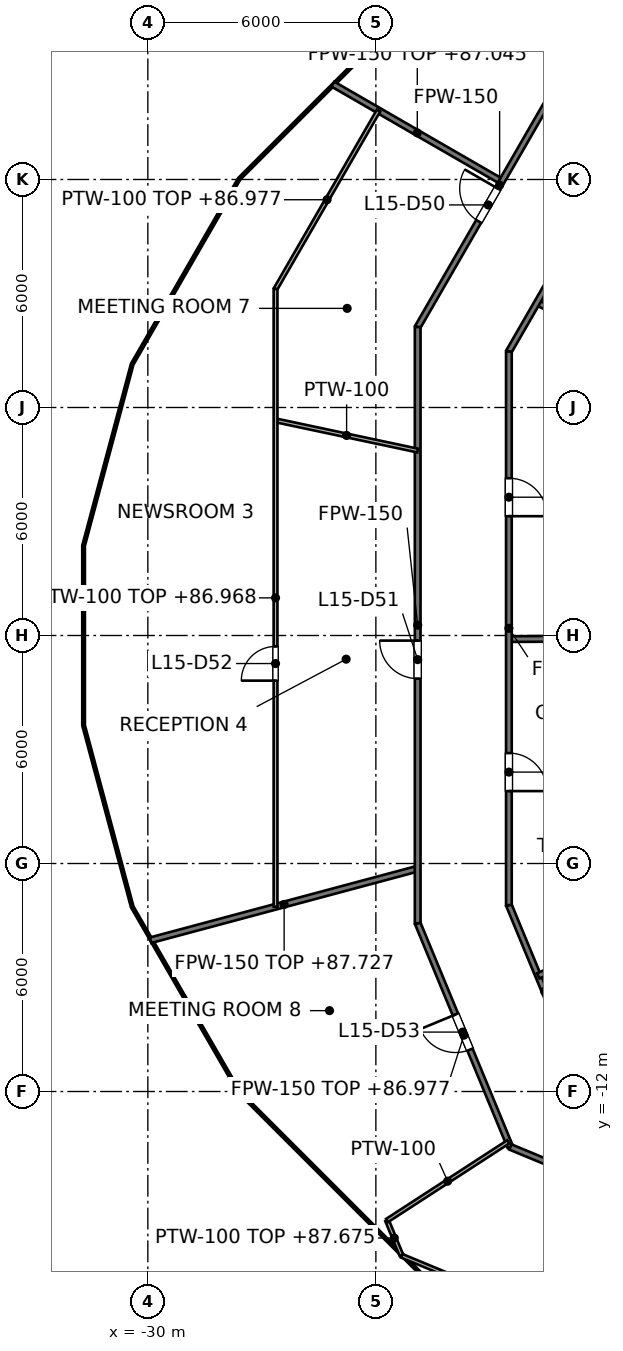
"""IFC4 building model, lengths in metres.
Left out: names, types, materials, properties, quantities, classifications, styles, units other than length and angle.
Written with IfcOpenShell. Run it as: python <this file> out.ifc"""

import sys

from ifc_helpers import new_model, si_unit, direction, frame, frame_2d, origin, place, context, subcontext, project, spatial, rectangle, extrude, element, fill, save


model = new_model("IFC4")
c1 = context("Model", 3, precision=1e-05, world=origin(), true_north=direction((0.0, 1.0)))
c2 = subcontext(c1, "Body", "Model", "MODEL_VIEW")
j1 = project(units=[si_unit("LENGTHUNIT", "METRE"), si_unit("PLANEANGLEUNIT", "RADIAN")], contexts=[c1])
p1 = place(None, origin())
s1 = spatial("IfcSite", under=j1, at=p1, CompositionType="ELEMENT")
p2 = place(p1, origin())
s2 = spatial("IfcBuilding", under=s1, at=p2, CompositionType="ELEMENT")
p3 = place(p2, frame((0.0, 0.0, 84.0)))
s3 = spatial("IfcBuildingStorey", under=s2, at=p3, CompositionType="ELEMENT", Elevation=84.0)
p4 = place(p3, frame((-22.9, -7.572, 0.0), z_axis=(0.0, 0.0, 1.0), x_axis=(0.382367581622, -0.924010298928, 0.0)))
e1 = element("IfcWall", 1, at=p4, inside=s3, PredefinedType="PARTITIONING", context=c2, shape_type="SweptSolid", body=[
    extrude(rectangle(XDim=6.374, YDim=0.15, at=frame_2d((3.187, 0.0))), origin(), (0.0, 0.0, 1.0), 2.977),
])
p5 = place(p4, frame((2.6, 0.0, 0.0)))
e2 = element("IfcOpeningElement", 2, at=p5, cuts=e1, PredefinedType="OPENING", context=c2, shape_type="SweptSolid", body=[
    extrude(rectangle(XDim=1.0, YDim=2.1, at=frame_2d((0.5, 1.05))), frame((0.0, 0.075, 0.0), z_axis=(0.0, -1.0, 0.0), x_axis=(1.0, 0.0, 0.0)), (0.0, 0.0, 1.0), 0.15),
])
p6 = place(p3, frame((-20.5, -7.095, 0.0), z_axis=(0.0, 0.0, 1.0), x_axis=(0.382364990163, -0.924011371303, 0.0)))
e3 = element("IfcWall", 3, at=p6, inside=s3, PredefinedType="PARTITIONING", context=c2, shape_type="SweptSolid", body=[
    extrude(rectangle(XDim=4.902, YDim=0.15, at=frame_2d((2.451, 0.0))), origin(), (0.0, 0.0, 1.0), 2.977),
])
p7 = place(p3, frame((-25.131, 14.509, 0.0), z_axis=(0.0, 0.0, 1.0), x_axis=(0.866037334331, -0.499979335118, 0.0)))
e4 = element("IfcWall", 4, at=p7, inside=s3, PredefinedType="PARTITIONING", context=c2, shape_type="SweptSolid", body=[
    extrude(rectangle(XDim=5.128, YDim=0.15, at=frame_2d((2.564, 0.0))), origin(), (0.0, 0.0, 1.0), 3.045),
])
p8 = place(p3, frame((-19.76, 8.755, 0.0), z_axis=(0.0, 0.0, 1.0), x_axis=(0.91424834547, -0.405154245695, 0.0)))
e5 = element("IfcWall", 5, at=p8, inside=s3, PredefinedType="PARTITIONING", context=c2, shape_type="SweptSolid", body=[
    extrude(rectangle(XDim=5.318, YDim=0.15, at=frame_2d((2.659, 0.0))), origin(), (0.0, 0.0, 1.0), 2.977),
])
p9 = place(p3, frame((-20.46, -13.46, 0.0), z_axis=(0.0, 0.0, 1.0), x_axis=(0.923801547606, -0.382871650349, 0.0)))
e6 = element("IfcWall", 6, at=p9, inside=s3, PredefinedType="PARTITIONING", context=c2, shape_type="SweptSolid", body=[
    extrude(rectangle(XDim=6.415, YDim=0.15, at=frame_2d((3.208, 0.0))), origin(), (0.0, 0.0, 1.0), 2.968),
])
p10 = place(p9, frame((2.707, 0.0, 0.0)))
e7 = element("IfcOpeningElement", 7, at=p10, cuts=e6, PredefinedType="OPENING", context=c2, shape_type="SweptSolid", body=[
    extrude(rectangle(XDim=1.0, YDim=2.1, at=frame_2d((0.5, 1.05))), frame((0.0, 0.075, 0.0), z_axis=(0.0, -1.0, 0.0), x_axis=(1.0, 0.0, 0.0)), (0.0, 0.0, 1.0), 0.15),
])
p11 = place(p3, frame((-20.5, -0.094, 0.0), z_axis=(0.0, 0.0, 1.0), x_axis=(0.999990148138, 0.004438876723, 0.0)))
e8 = element("IfcWall", 8, at=p11, inside=s3, PredefinedType="PARTITIONING", context=c2, shape_type="SweptSolid", body=[
    extrude(rectangle(XDim=5.5, YDim=0.15, at=frame_2d((2.75, 0.0))), origin(), (0.0, 0.0, 1.0), 2.968),
])
p12 = place(p3, frame((-29.928, -8.019, 0.0), z_axis=(0.0, 0.0, 1.0), x_axis=(0.965929629594, 0.258804850559, 0.0)))
e9 = element("IfcWall", 9, at=p12, inside=s3, PredefinedType="PARTITIONING", context=c2, shape_type="SweptSolid", body=[
    extrude(rectangle(XDim=7.276, YDim=0.15, at=frame_2d((3.638, 0.0))), origin(), (0.0, 0.0, 1.0), 3.727),
])
p13 = place(p3, frame((-19.728, -8.958, 0.0), z_axis=(0.0, 0.0, 1.0), x_axis=(0.910629511797, 0.413223779863, 0.0)))
e10 = element("IfcWall", 10, at=p13, inside=s3, PredefinedType="PARTITIONING", context=c2, shape_type="SweptSolid", body=[
    extrude(rectangle(XDim=5.368, YDim=0.15, at=frame_2d((2.684, 0.0))), origin(), (0.0, 0.0, 1.0), 3.9),
])
p14 = place(p3, frame((-20.5, 7.474, 0.0), z_axis=(0.0, 0.0, 1.0), x_axis=(0.500012665616, 0.866018091164, 0.0)))
e11 = element("IfcWall", 11, at=p14, inside=s3, PredefinedType="PARTITIONING", context=c2, shape_type="SweptSolid", body=[
    extrude(rectangle(XDim=6.602, YDim=0.15, at=frame_2d((3.301, 0.0))), origin(), (0.0, 0.0, 1.0), 2.968),
])
p15 = place(p14, frame((2.803, 0.0, 0.0)))
e12 = element("IfcOpeningElement", 12, at=p15, cuts=e11, PredefinedType="OPENING", context=c2, shape_type="SweptSolid", body=[
    extrude(rectangle(XDim=1.0, YDim=2.1, at=frame_2d((0.5, 1.05))), frame((0.0, 0.075, 0.0), z_axis=(0.0, -1.0, 0.0), x_axis=(1.0, 0.0, 0.0)), (0.0, 0.0, 1.0), 0.15),
])
p16 = place(p3, frame((-22.9, 8.117, 0.0), z_axis=(0.0, 0.0, 1.0), x_axis=(0.5000050195, 0.866022505755, 0.0)))
e13 = element("IfcWall", 13, at=p16, inside=s3, PredefinedType="PARTITIONING", context=c2, shape_type="SweptSolid", body=[
    extrude(rectangle(XDim=8.626, YDim=0.15, at=frame_2d((4.313, 0.0))), origin(), (0.0, 0.0, 1.0), 2.968),
])
p17 = place(p16, frame((3.211, 0.0, 0.0)))
e14 = element("IfcOpeningElement", 14, at=p17, cuts=e13, PredefinedType="OPENING", context=c2, shape_type="SweptSolid", body=[
    extrude(rectangle(XDim=1.0, YDim=2.1, at=frame_2d((0.5, 1.05))), frame((0.0, 0.075, 0.0), z_axis=(0.0, -1.0, 0.0), x_axis=(1.0, 0.0, 0.0)), (0.0, 0.0, 1.0), 0.15),
])
p18 = place(p3, frame((-20.5, -7.095, 0.0), z_axis=(0.0, 0.0, 1.0), x_axis=(0.0, 1.0, 0.0)))
e15 = element("IfcWall", 15, at=p18, inside=s3, PredefinedType="PARTITIONING", context=c2, shape_type="SweptSolid", body=[
    extrude(rectangle(XDim=14.569, YDim=0.15, at=frame_2d((7.285, 0.0))), origin(), (0.0, 0.0, 1.0), 2.968),
])
p19 = place(p18, frame((10.234, 0.0, 0.0)))
e16 = element("IfcOpeningElement", 16, at=p19, cuts=e15, PredefinedType="OPENING", context=c2, shape_type="SweptSolid", body=[
    extrude(rectangle(XDim=1.0, YDim=2.1, at=frame_2d((0.5, 1.05))), frame((0.0, 0.075, 0.0), z_axis=(0.0, -1.0, 0.0), x_axis=(1.0, 0.0, 0.0)), (0.0, 0.0, 1.0), 0.15),
])
p20 = place(p18, frame((3.0, 0.0, 0.0)))
e17 = element("IfcOpeningElement", 17, at=p20, cuts=e15, PredefinedType="OPENING", context=c2, shape_type="SweptSolid", body=[
    extrude(rectangle(XDim=1.0, YDim=2.1, at=frame_2d((0.5, 1.05))), frame((0.0, 0.075, 0.0), z_axis=(0.0, -1.0, 0.0), x_axis=(1.0, 0.0, 0.0)), (0.0, 0.0, 1.0), 0.15),
])
p21 = place(p3, frame((-22.9, -7.572, 0.0), z_axis=(0.0, 0.0, 1.0), x_axis=(0.0, 1.0, 0.0)))
e18 = element("IfcWall", 18, at=p21, inside=s3, PredefinedType="PARTITIONING", context=c2, shape_type="SweptSolid", body=[
    extrude(rectangle(XDim=15.689, YDim=0.15, at=frame_2d((7.844, 0.0))), origin(), (0.0, 0.0, 1.0), 2.968),
])
p22 = place(p21, frame((6.438, 0.0, 0.0)))
e19 = element("IfcOpeningElement", 19, at=p22, cuts=e18, PredefinedType="OPENING", context=c2, shape_type="SweptSolid", body=[
    extrude(rectangle(XDim=1.0, YDim=2.1, at=frame_2d((0.5, 1.05))), frame((0.0, 0.075, 0.0), z_axis=(0.0, -1.0, 0.0), x_axis=(1.0, 0.0, 0.0)), (0.0, 0.0, 1.0), 0.15),
])
p23 = place(p3, frame((-23.706, -15.395, 0.0), z_axis=(0.0, 0.0, 1.0), x_axis=(0.382734348683, -0.923858440638, 0.0)))
e20 = element("IfcWall", 20, at=p23, inside=s3, PredefinedType="PARTITIONING", context=c2, shape_type="SweptSolid", body=[
    extrude(rectangle(XDim=0.996, YDim=0.1, at=frame_2d((0.498, 0.0))), origin(), (0.0, 0.0, 1.0), 3.675),
])
p24 = place(p3, frame((-23.315, -16.325, 0.0), z_axis=(0.0, 0.0, 1.0), x_axis=(0.923811686722, -0.382847185541, 0.0)))
e21 = element("IfcWall", 21, at=p24, inside=s3, PredefinedType="PARTITIONING", context=c2, shape_type="SweptSolid", body=[
    extrude(rectangle(XDim=8.719, YDim=0.1, at=frame_2d((4.36, 0.0))), origin(), (0.0, 0.0, 1.0), 2.968),
])
p25 = place(p3, frame((-26.64, 5.662, 0.0), z_axis=(0.0, 0.0, 1.0), x_axis=(0.978136613381, -0.207963375533, 0.0)))
e22 = element("IfcWall", 22, at=p25, inside=s3, PredefinedType="PARTITIONING", context=c2, shape_type="SweptSolid", body=[
    extrude(rectangle(XDim=3.823, YDim=0.1, at=frame_2d((1.912, 0.0))), origin(), (0.0, 0.0, 1.0), 3.9),
])
p26 = place(p3, frame((-23.706, -15.395, 0.0), z_axis=(0.0, 0.0, 1.0), x_axis=(0.838733884708, 0.544541523341, 0.0)))
e23 = element("IfcWall", 23, at=p26, inside=s3, PredefinedType="PARTITIONING", context=c2, shape_type="SweptSolid", body=[
    extrude(rectangle(XDim=3.803, YDim=0.1, at=frame_2d((1.902, 0.0))), origin(), (0.0, 0.0, 1.0), 3.9),
])
p27 = place(p3, frame((-26.64, 9.119, 0.0), z_axis=(0.0, 0.0, 1.0), x_axis=(0.499955005135, 0.866051380023, 0.0)))
e24 = element("IfcWall", 24, at=p27, inside=s3, PredefinedType="PARTITIONING", context=c2, shape_type="SweptSolid", body=[
    extrude(rectangle(XDim=5.422, YDim=0.1, at=frame_2d((2.711, 0.0))), origin(), (0.0, 0.0, 1.0), 2.977),
])
p28 = place(p3, frame((-26.64, -7.138, 0.0), z_axis=(0.0, 0.0, 1.0), x_axis=(0.0, 1.0, 0.0)))
e25 = element("IfcWall", 25, at=p28, inside=s3, PredefinedType="PARTITIONING", context=c2, shape_type="SweptSolid", body=[
    extrude(rectangle(XDim=16.257, YDim=0.1, at=frame_2d((8.128, 0.0))), origin(), (0.0, 0.0, 1.0), 2.968),
])
p29 = place(p28, frame((5.95, 0.0, 0.0)))
e26 = element("IfcOpeningElement", 26, at=p29, cuts=e25, PredefinedType="OPENING", context=c2, shape_type="SweptSolid", body=[
    extrude(rectangle(XDim=0.9, YDim=2.1, at=frame_2d((0.45, 1.05))), frame((0.0, 0.05, 0.0), z_axis=(0.0, -1.0, 0.0), x_axis=(1.0, 0.0, 0.0)), (0.0, 0.0, 1.0), 0.1),
])
p30 = place(p19, origin())
e27 = element("IfcDoor", 27, at=p30, inside=s3, OperationType="SINGLE_SWING_LEFT", PredefinedType="DOOR", context=c2, shape_type="SweptSolid", body=[
    extrude(rectangle(XDim=1.0, YDim=2.1, at=frame_2d((0.5, 1.05))), frame((0.0, 0.025, 0.0), z_axis=(0.0, -1.0, 0.0), x_axis=(1.0, 0.0, 0.0)), (0.0, 0.0, 1.0), 0.05),
])
fill(e16, e27)
p31 = place(p20, origin())
e28 = element("IfcDoor", 28, at=p31, inside=s3, OperationType="SINGLE_SWING_LEFT", PredefinedType="DOOR", context=c2, shape_type="SweptSolid", body=[
    extrude(rectangle(XDim=1.0, YDim=2.1, at=frame_2d((0.5, 1.05))), frame((0.0, 0.025, 0.0), z_axis=(0.0, -1.0, 0.0), x_axis=(1.0, 0.0, 0.0)), (0.0, 0.0, 1.0), 0.05),
])
fill(e17, e28)
p32 = place(p17, origin())
e29 = element("IfcDoor", 29, at=p32, inside=s3, OperationType="SINGLE_SWING_RIGHT", PredefinedType="DOOR", context=c2, shape_type="SweptSolid", body=[
    extrude(rectangle(XDim=1.0, YDim=2.1, at=frame_2d((0.5, 1.05))), frame((0.0, 0.025, 0.0), z_axis=(0.0, -1.0, 0.0), x_axis=(1.0, 0.0, 0.0)), (0.0, 0.0, 1.0), 0.05),
])
fill(e14, e29)
p33 = place(p22, origin())
e30 = element("IfcDoor", 30, at=p33, inside=s3, OperationType="SINGLE_SWING_RIGHT", PredefinedType="DOOR", context=c2, shape_type="SweptSolid", body=[
    extrude(rectangle(XDim=1.0, YDim=2.1, at=frame_2d((0.5, 1.05))), frame((0.0, 0.025, 0.0), z_axis=(0.0, -1.0, 0.0), x_axis=(1.0, 0.0, 0.0)), (0.0, 0.0, 1.0), 0.05),
])
fill(e19, e30)
p34 = place(p29, origin())
e31 = element("IfcDoor", 31, at=p34, inside=s3, OperationType="SINGLE_SWING_LEFT", PredefinedType="DOOR", context=c2, shape_type="SweptSolid", body=[
    extrude(rectangle(XDim=0.9, YDim=2.1, at=frame_2d((0.45, 1.05))), frame((0.0, 0.025, 0.0), z_axis=(0.0, -1.0, 0.0), x_axis=(1.0, 0.0, 0.0)), (0.0, 0.0, 1.0), 0.05),
])
fill(e26, e31)
p35 = place(p5, origin())
e32 = element("IfcDoor", 32, at=p35, inside=s3, OperationType="SINGLE_SWING_LEFT", PredefinedType="DOOR", context=c2, shape_type="SweptSolid", body=[
    extrude(rectangle(XDim=1.0, YDim=2.1, at=frame_2d((0.5, 1.05))), frame((0.0, 0.025, 0.0), z_axis=(0.0, -1.0, 0.0), x_axis=(1.0, 0.0, 0.0)), (0.0, 0.0, 1.0), 0.05),
])
fill(e2, e32)
save(model, sys.argv[1])
